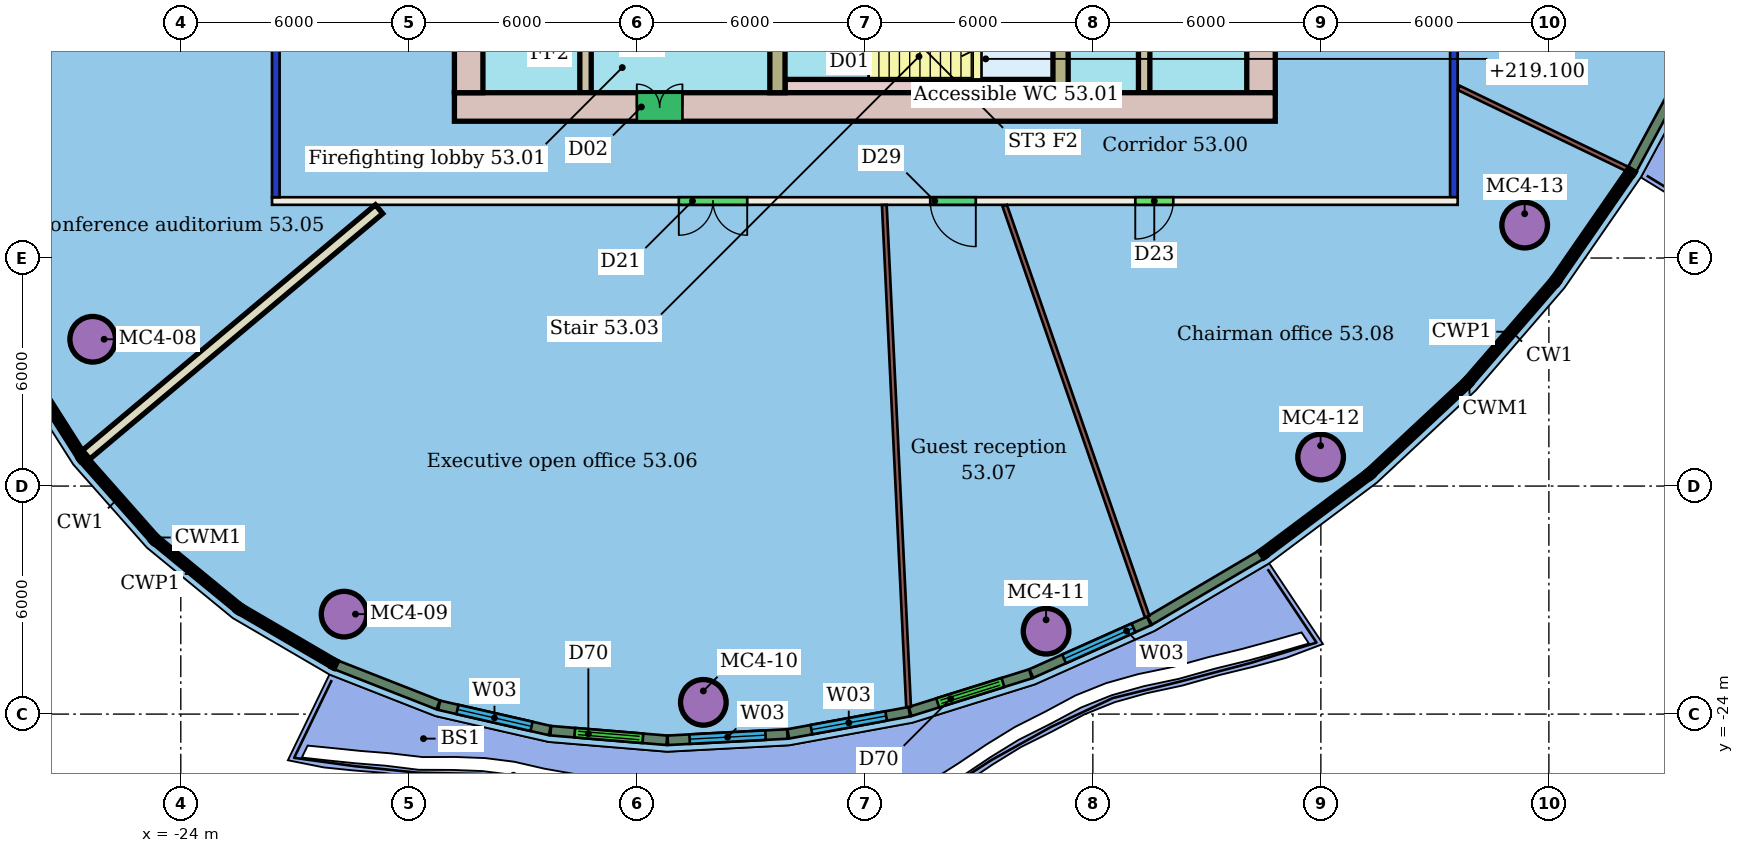
"""IFC4 building model, lengths in metres.
Left out: names, types, materials, properties, quantities, classifications, styles, units other than length and angle.
Written with IfcOpenShell. Run it as: python <this file> out.ifc"""

import sys

from ifc_helpers import new_model, si_unit, direction, frame, frame_2d, origin, origin_2d, place, context, subcontext, project, spatial, rectangle, hollow_circle, extrude, element, fill, save


model = new_model("IFC4")
c1 = context("Model", 3, precision=1e-05, world=origin(), true_north=direction((0.0, 1.0)))
c2 = subcontext(c1, "Body", "Model", "MODEL_VIEW")
j1 = project(units=[si_unit("LENGTHUNIT", "METRE"), si_unit("PLANEANGLEUNIT", "RADIAN")], contexts=[c1])
p1 = place(None, origin())
s1 = spatial("IfcSite", under=j1, at=p1, CompositionType="ELEMENT")
p2 = place(p1, origin())
s2 = spatial("IfcBuilding", under=s1, at=p2, CompositionType="ELEMENT")
p3 = place(p2, frame((0.0, 0.0, 217.3)))
s3 = spatial("IfcBuildingStorey", under=s2, at=p3, CompositionType="ELEMENT", Elevation=217.3)
for number, where, z_axis, x_axis in (
    (1, (-26.318, -14.137, 0.0), (0.0, 0.0, 1.0), (1.0, 0.0, 0.0)),
    (2, (-19.704, -21.37, 0.0), (0.0, 0.0, 1.0), (1.0, 0.0, 0.0)),
    (3, (-10.25, -23.691, 0.0), (0.0, 0.0, 1.0), (1.0, 0.0, 0.0)),
    (4, (-1.231, -21.819, 0.0), (0.0, 0.0, 1.0), (1.0, 0.0, 0.0)),
    (5, (5.993, -17.237, 0.0), (0.0, 0.0, 1.0), (1.0, 0.0, 0.0)),
    (6, (11.363, -11.134, 0.0), (0.0, 0.0, 1.0), (1.0, 0.0, 0.0)),
):
    element("IfcColumn", number, at=place(p3, frame(where, z_axis=z_axis, x_axis=x_axis)), inside=s3, PredefinedType="COLUMN", context=c2, shape_type="SweptSolid", body=[
        extrude(hollow_circle(Radius=0.6, WallThickness=0.045, at=origin_2d()), origin(), (0.0, 0.0, 1.0), 3.45),
    ])
p4 = place(p3, frame((9.6, -10.5, 0.0), z_axis=(0.0, 0.0, 1.0), x_axis=(-1.0, 0.0, 0.0)))
e7 = element("IfcWall", 7, at=p4, inside=s3, PredefinedType="PARTITIONING", context=c2, shape_type="SweptSolid", body=[
    extrude(rectangle(XDim=31.2, YDim=0.2, at=frame_2d((15.6, 0.0))), origin(), (0.0, 0.0, 1.0), 3.45),
])
p5 = place(p4, frame((18.695, 0.0, 0.0)))
e8 = element("IfcOpeningElement", 8, at=p5, cuts=e7, PredefinedType="OPENING", context=c2, shape_type="SweptSolid", body=[
    extrude(rectangle(XDim=1.8, YDim=2.1, at=frame_2d((0.9, 1.05))), frame((0.0, 0.11, 0.0), z_axis=(0.0, -1.0, 0.0), x_axis=(1.0, 0.0, 0.0)), (0.0, 0.0, 1.0), 0.22),
])
p6 = place(p4, frame((12.68, 0.0, 0.0)))
e9 = element("IfcOpeningElement", 9, at=p6, cuts=e7, PredefinedType="OPENING", context=c2, shape_type="SweptSolid", body=[
    extrude(rectangle(XDim=1.2, YDim=2.4, at=frame_2d((0.6, 1.2))), frame((0.0, 0.11, 0.0), z_axis=(0.0, -1.0, 0.0), x_axis=(1.0, 0.0, 0.0)), (0.0, 0.0, 1.0), 0.22),
])
p7 = place(p4, frame((7.484, 0.0, 0.0)))
e10 = element("IfcOpeningElement", 10, at=p7, cuts=e7, PredefinedType="OPENING", context=c2, shape_type="SweptSolid", body=[
    extrude(rectangle(XDim=1.0, YDim=2.4, at=frame_2d((0.5, 1.2))), frame((0.0, 0.11, 0.0), z_axis=(0.0, -1.0, 0.0), x_axis=(1.0, 0.0, 0.0)), (0.0, 0.0, 1.0), 0.22),
])
p8 = place(p3, frame((-21.5, -10.4, 0.0), z_axis=(0.0, 0.0, 1.0), x_axis=(0.0, 1.0, 0.0)))
e11 = element("IfcWall", 11, at=p8, inside=s3, PredefinedType="PARTITIONING", context=c2, shape_type="SweptSolid", body=[
    extrude(rectangle(XDim=20.8, YDim=0.2, at=frame_2d((10.4, 0.0))), origin(), (0.0, 0.0, 1.0), 3.05),
])
p9 = place(p8, frame((13.596, 0.0, 0.0)))
e12 = element("IfcOpeningElement", 12, at=p9, cuts=e11, PredefinedType="OPENING", context=c2, shape_type="SweptSolid", body=[
    extrude(rectangle(XDim=1.0, YDim=2.4, at=frame_2d((0.5, 1.2))), frame((0.0, 0.11, 0.0), z_axis=(0.0, -1.0, 0.0), x_axis=(1.0, 0.0, 0.0)), (0.0, 0.0, 1.0), 0.22),
])
p10 = place(p8, frame((5.876, 0.0, 0.0)))
e13 = element("IfcOpeningElement", 13, at=p10, cuts=e11, PredefinedType="OPENING", context=c2, shape_type="SweptSolid", body=[
    extrude(rectangle(XDim=1.8, YDim=2.4, at=frame_2d((0.9, 1.2))), frame((0.0, 0.11, 0.0), z_axis=(0.0, -1.0, 0.0), x_axis=(1.0, 0.0, 0.0)), (0.0, 0.0, 1.0), 0.22),
])
p11 = place(p3, frame((9.5, 10.4, 0.0), z_axis=(0.0, 0.0, 1.0), x_axis=(0.0, -1.0, 0.0)))
e14 = element("IfcWall", 14, at=p11, inside=s3, PredefinedType="PARTITIONING", context=c2, shape_type="SweptSolid", body=[
    extrude(rectangle(XDim=20.8, YDim=0.2, at=frame_2d((10.4, 0.0))), origin(), (0.0, 0.0, 1.0), 3.05),
])
p12 = place(p11, frame((14.911, 0.0, 0.0)))
e15 = element("IfcOpeningElement", 15, at=p12, cuts=e14, PredefinedType="OPENING", context=c2, shape_type="SweptSolid", body=[
    extrude(rectangle(XDim=0.9, YDim=2.1, at=frame_2d((0.45, 1.05))), frame((0.0, 0.11, 0.0), z_axis=(0.0, -1.0, 0.0), x_axis=(1.0, 0.0, 0.0)), (0.0, 0.0, 1.0), 0.22),
])
p13 = place(p11, frame((4.489, 0.0, 0.0)))
e16 = element("IfcOpeningElement", 16, at=p13, cuts=e14, PredefinedType="OPENING", context=c2, shape_type="SweptSolid", body=[
    extrude(rectangle(XDim=1.5, YDim=2.1, at=frame_2d((0.75, 1.05))), frame((0.0, 0.11, 0.0), z_axis=(0.0, -1.0, 0.0), x_axis=(1.0, 0.0, 0.0)), (0.0, 0.0, 1.0), 0.22),
])
p14 = place(p3, frame((-26.491, -17.175, 0.0), z_axis=(0.0, 0.0, 1.0), x_axis=(0.766383519692, 0.642383297374, 0.0)))
e17 = element("IfcWall", 17, at=p14, inside=s3, PredefinedType="PARTITIONING", context=c2, shape_type="SweptSolid", body=[
    extrude(rectangle(XDim=10.057, YDim=0.3, at=frame_2d((5.028, 0.0))), origin(), (0.0, 0.0, 1.0), 3.45),
])
p15 = place(p3, frame((-4.849, -23.814, 0.0), z_axis=(0.0, 0.0, 1.0), x_axis=(-0.048269364244, 0.998834354873, 0.0)))
e18 = element("IfcWall", 18, at=p15, inside=s3, PredefinedType="PARTITIONING", context=c2, shape_type="SweptSolid", body=[
    extrude(rectangle(XDim=13.226, YDim=0.125, at=frame_2d((6.613, 0.0))), origin(), (0.0, 0.0, 1.0), 3.45),
])
p16 = place(p3, frame((1.428, -21.434, 0.0), z_axis=(0.0, 0.0, 1.0), x_axis=(-0.327449773214, 0.944868586642, 0.0)))
e19 = element("IfcWall", 19, at=p16, inside=s3, PredefinedType="PARTITIONING", context=c2, shape_type="SweptSolid", body=[
    extrude(rectangle(XDim=11.445, YDim=0.125, at=frame_2d((5.722, 0.0))), origin(), (0.0, 0.0, 1.0), 3.45),
])
p17 = place(p3, frame((14.057, -9.655, 0.0), z_axis=(0.0, 0.0, 1.0), x_axis=(-0.901030422523, 0.433755896431, 0.0)))
e20 = element("IfcWall", 20, at=p17, inside=s3, PredefinedType="PARTITIONING", context=c2, shape_type="SweptSolid", body=[
    extrude(rectangle(XDim=4.917, YDim=0.125, at=frame_2d((2.458, 0.0))), origin(), (0.0, 0.0, 1.0), 3.45),
])
p18 = place(p3, frame((-19.907, -22.708, 0.0), z_axis=(0.0, 0.0, 1.0), x_axis=(0.930924579426, -0.365211483146, 0.0)))
e21 = element("IfcWall", 21, at=p18, inside=s3, PredefinedType="SOLIDWALL", context=c2, shape_type="SweptSolid", body=[
    extrude(rectangle(XDim=2.878, YDim=0.25, at=frame_2d((1.439, 0.0))), origin(), (0.0, 0.0, 1.0), 3.1),
])
p19 = place(p3, frame((-17.202, -23.767, 0.0), z_axis=(0.0, 0.0, 1.0), x_axis=(0.974849372508, -0.222864759263, 0.0)))
e22 = element("IfcWall", 22, at=p19, inside=s3, PredefinedType="SOLIDWALL", context=c2, shape_type="SweptSolid", body=[
    extrude(rectangle(XDim=2.986, YDim=0.25, at=frame_2d((1.493, 0.0))), origin(), (0.0, 0.0, 1.0), 3.1),
])
p20 = place(p19, frame((0.493, 0.0, 0.9)))
e23 = element("IfcOpeningElement", 23, at=p20, cuts=e22, PredefinedType="OPENING", context=c2, shape_type="SweptSolid", body=[
    extrude(rectangle(XDim=2.0, YDim=2.1, at=frame_2d((1.0, 1.05))), frame((0.0, 0.135, 0.0), z_axis=(0.0, -1.0, 0.0), x_axis=(1.0, 0.0, 0.0)), (0.0, 0.0, 1.0), 0.27),
])
p21 = place(p3, frame((-14.265, -24.437, 0.0), z_axis=(0.0, 0.0, 1.0), x_axis=(0.996603192192, -0.082353368555, 0.0)))
e24 = element("IfcWall", 24, at=p21, inside=s3, PredefinedType="SOLIDWALL", context=c2, shape_type="SweptSolid", body=[
    extrude(rectangle(XDim=3.065, YDim=0.25, at=frame_2d((1.533, 0.0))), origin(), (0.0, 0.0, 1.0), 3.1),
])
p22 = place(p21, frame((0.633, 0.0, 0.0)))
e25 = element("IfcOpeningElement", 25, at=p22, cuts=e24, PredefinedType="OPENING", context=c2, shape_type="SweptSolid", body=[
    extrude(rectangle(XDim=1.8, YDim=2.4, at=frame_2d((0.9, 1.2))), frame((0.0, 0.135, 0.0), z_axis=(0.0, -1.0, 0.0), x_axis=(1.0, 0.0, 0.0)), (0.0, 0.0, 1.0), 0.27),
])
p23 = place(p3, frame((-11.186, -24.689, 0.0), z_axis=(0.0, 0.0, 1.0), x_axis=(0.998611186538, 0.052684894627, 0.0)))
e26 = element("IfcWall", 26, at=p23, inside=s3, PredefinedType="SOLIDWALL", context=c2, shape_type="SweptSolid", body=[
    extrude(rectangle(XDim=3.151, YDim=0.25, at=frame_2d((1.576, 0.0))), origin(), (0.0, 0.0, 1.0), 3.1),
])
p24 = place(p23, frame((0.575, 0.0, 0.9)))
e27 = element("IfcOpeningElement", 27, at=p24, cuts=e26, PredefinedType="OPENING", context=c2, shape_type="SweptSolid", body=[
    extrude(rectangle(XDim=2.0, YDim=2.1, at=frame_2d((1.0, 1.05))), frame((0.0, 0.135, 0.0), z_axis=(0.0, -1.0, 0.0), x_axis=(1.0, 0.0, 0.0)), (0.0, 0.0, 1.0), 0.27),
])
p25 = place(p3, frame((-8.015, -24.521, 0.0), z_axis=(0.0, 0.0, 1.0), x_axis=(0.98363864292, 0.180152768931, 0.0)))
e28 = element("IfcWall", 28, at=p25, inside=s3, PredefinedType="SOLIDWALL", context=c2, shape_type="SweptSolid", body=[
    extrude(rectangle(XDim=3.238, YDim=0.25, at=frame_2d((1.619, 0.0))), origin(), (0.0, 0.0, 1.0), 3.1),
])
p26 = place(p25, frame((0.619, 0.0, 0.9)))
e29 = element("IfcOpeningElement", 29, at=p26, cuts=e28, PredefinedType="OPENING", context=c2, shape_type="SweptSolid", body=[
    extrude(rectangle(XDim=2.0, YDim=2.1, at=frame_2d((1.0, 1.05))), frame((0.0, 0.135, 0.0), z_axis=(0.0, -1.0, 0.0), x_axis=(1.0, 0.0, 0.0)), (0.0, 0.0, 1.0), 0.27),
])
p27 = place(p3, frame((-4.808, -23.932, 0.0), z_axis=(0.0, 0.0, 1.0), x_axis=(0.954355541855, 0.298672897551, 0.0)))
e30 = element("IfcWall", 30, at=p27, inside=s3, PredefinedType="SOLIDWALL", context=c2, shape_type="SweptSolid", body=[
    extrude(rectangle(XDim=3.319, YDim=0.25, at=frame_2d((1.659, 0.0))), origin(), (0.0, 0.0, 1.0), 3.1),
])
p28 = place(p27, frame((0.759, 0.0, 0.0)))
e31 = element("IfcOpeningElement", 31, at=p28, cuts=e30, PredefinedType="OPENING", context=c2, shape_type="SweptSolid", body=[
    extrude(rectangle(XDim=1.8, YDim=2.4, at=frame_2d((0.9, 1.2))), frame((0.0, 0.135, 0.0), z_axis=(0.0, -1.0, 0.0), x_axis=(1.0, 0.0, 0.0)), (0.0, 0.0, 1.0), 0.27),
])
p29 = place(p3, frame((-1.62, -22.933, 0.0), z_axis=(0.0, 0.0, 1.0), x_axis=(0.913013847156, 0.40792856593, 0.0)))
e32 = element("IfcWall", 32, at=p29, inside=s3, PredefinedType="SOLIDWALL", context=c2, shape_type="SweptSolid", body=[
    extrude(rectangle(XDim=3.39, YDim=0.25, at=frame_2d((1.695, 0.0))), origin(), (0.0, 0.0, 1.0), 3.1),
])
p30 = place(p29, frame((0.945, 0.0, 0.9)))
e33 = element("IfcOpeningElement", 33, at=p30, cuts=e32, PredefinedType="OPENING", context=c2, shape_type="SweptSolid", body=[
    extrude(rectangle(XDim=2.0, YDim=2.1, at=frame_2d((1.0, 1.05))), frame((0.0, 0.135, 0.0), z_axis=(0.0, -1.0, 0.0), x_axis=(1.0, 0.0, 0.0)), (0.0, 0.0, 1.0), 0.27),
])
for number, where, z_axis, x_axis in (
    (34, (1.495, -21.54, 0.0), (0.0, 0.0, 1.0), (0.861, 0.508, 0.0)),
    (35, (14.19, -9.671, 0.0), (0.0, 0.0, 1.0), (0.475, 0.88, 0.0)),
):
    element("IfcWall", number, at=place(p3, frame(where, z_axis=z_axis, x_axis=x_axis)), inside=s3, PredefinedType="SOLIDWALL", context=c2, shape_type="SweptSolid", body=[
        extrude(rectangle(XDim=3.403, YDim=0.25, at=frame_2d((1.701, 0.0))), origin(), (0.0, 0.0, 1.0), 3.1),
    ])
p31 = place(p3, frame((-16.8, -8.025, 0.0), z_axis=(0.0, 0.0, 1.0), x_axis=(1.0, 0.0, 0.0)))
e36 = element("IfcWall", 36, at=p31, inside=s3, PredefinedType="SHEAR", context=c2, shape_type="SweptSolid", body=[
    extrude(rectangle(XDim=21.6, YDim=0.75, at=frame_2d((10.8, 0.0))), origin(), (0.0, 0.0, 1.0), 3.3),
])
p32 = place(p31, frame((4.8, 0.0, 0.0)))
e37 = element("IfcOpeningElement", 37, at=p32, cuts=e36, PredefinedType="OPENING", context=c2, shape_type="SweptSolid", body=[
    extrude(rectangle(XDim=1.2, YDim=2.1, at=frame_2d((0.6, 1.05))), frame((0.0, 0.385, 0.0), z_axis=(0.0, -1.0, 0.0), x_axis=(1.0, 0.0, 0.0)), (0.0, 0.0, 1.0), 0.77),
])
p33 = place(p3, frame((-16.425, 7.65, 0.0), z_axis=(0.0, 0.0, 1.0), x_axis=(0.0, -1.0, 0.0)))
e38 = element("IfcWall", 38, at=p33, inside=s3, PredefinedType="SHEAR", context=c2, shape_type="SweptSolid", body=[
    extrude(rectangle(XDim=15.3, YDim=0.75, at=frame_2d((7.65, 0.0))), origin(), (0.0, 0.0, 1.0), 3.3),
])
p34 = place(p33, frame((11.25, 0.0, 0.0)))
e39 = element("IfcOpeningElement", 39, at=p34, cuts=e38, PredefinedType="OPENING", context=c2, shape_type="SweptSolid", body=[
    extrude(rectangle(XDim=1.2, YDim=2.1, at=frame_2d((0.6, 1.05))), frame((0.0, 0.385, 0.0), z_axis=(0.0, -1.0, 0.0), x_axis=(1.0, 0.0, 0.0)), (0.0, 0.0, 1.0), 0.77),
])
p35 = place(p33, frame((2.85, 0.0, 0.0)))
e40 = element("IfcOpeningElement", 40, at=p35, cuts=e38, PredefinedType="OPENING", context=c2, shape_type="SweptSolid", body=[
    extrude(rectangle(XDim=1.2, YDim=2.1, at=frame_2d((0.6, 1.05))), frame((0.0, 0.385, 0.0), z_axis=(0.0, -1.0, 0.0), x_axis=(1.0, 0.0, 0.0)), (0.0, 0.0, 1.0), 0.77),
])
p36 = place(p3, frame((4.425, -7.65, 0.0), z_axis=(0.0, 0.0, 1.0), x_axis=(0.0, 1.0, 0.0)))
e41 = element("IfcWall", 41, at=p36, inside=s3, PredefinedType="SHEAR", context=c2, shape_type="SweptSolid", body=[
    extrude(rectangle(XDim=15.3, YDim=0.75, at=frame_2d((7.65, 0.0))), origin(), (0.0, 0.0, 1.0), 3.3),
])
p37 = place(p36, frame((2.85, 0.0, 0.0)))
e42 = element("IfcOpeningElement", 42, at=p37, cuts=e41, PredefinedType="OPENING", context=c2, shape_type="SweptSolid", body=[
    extrude(rectangle(XDim=1.2, YDim=2.1, at=frame_2d((0.6, 1.05))), frame((0.0, 0.385, 0.0), z_axis=(0.0, -1.0, 0.0), x_axis=(1.0, 0.0, 0.0)), (0.0, 0.0, 1.0), 0.77),
])
p38 = place(p36, frame((11.25, 0.0, 0.0)))
e43 = element("IfcOpeningElement", 43, at=p38, cuts=e41, PredefinedType="OPENING", context=c2, shape_type="SweptSolid", body=[
    extrude(rectangle(XDim=1.2, YDim=2.1, at=frame_2d((0.6, 1.05))), frame((0.0, 0.385, 0.0), z_axis=(0.0, -1.0, 0.0), x_axis=(1.0, 0.0, 0.0)), (0.0, 0.0, 1.0), 0.77),
])
p39 = place(p3, frame((-13.35, 7.65, 0.0), z_axis=(0.0, 0.0, 1.0), x_axis=(0.0, -1.0, 0.0)))
e44 = element("IfcWall", 44, at=p39, inside=s3, PredefinedType="SHEAR", context=c2, shape_type="SweptSolid", body=[
    extrude(rectangle(XDim=15.3, YDim=0.3, at=frame_2d((7.65, 0.0))), origin(), (0.0, 0.0, 1.0), 3.3),
])
p40 = place(p39, frame((6.9, 0.0, 0.0)))
e45 = element("IfcOpeningElement", 45, at=p40, cuts=e44, PredefinedType="OPENING", context=c2, shape_type="SweptSolid", body=[
    extrude(rectangle(XDim=1.5, YDim=2.1, at=frame_2d((0.75, 1.05))), frame((0.0, 0.16, 0.0), z_axis=(0.0, -1.0, 0.0), x_axis=(1.0, 0.0, 0.0)), (0.0, 0.0, 1.0), 0.32),
])
p41 = place(p3, frame((1.35, -7.65, 0.0), z_axis=(0.0, 0.0, 1.0), x_axis=(0.0, 1.0, 0.0)))
e46 = element("IfcWall", 46, at=p41, inside=s3, PredefinedType="SHEAR", context=c2, shape_type="SweptSolid", body=[
    extrude(rectangle(XDim=15.3, YDim=0.3, at=frame_2d((7.65, 0.0))), origin(), (0.0, 0.0, 1.0), 3.3),
])
p42 = place(p41, frame((1.56, 0.0, 0.0)))
e47 = element("IfcOpeningElement", 47, at=p42, cuts=e46, PredefinedType="OPENING", context=c2, shape_type="SweptSolid", body=[
    extrude(rectangle(XDim=1.0, YDim=2.1, at=frame_2d((0.5, 1.05))), frame((0.0, 0.16, 0.0), z_axis=(0.0, -1.0, 0.0), x_axis=(1.0, 0.0, 0.0)), (0.0, 0.0, 1.0), 0.32),
])
p43 = place(p41, frame((6.9, 0.0, 0.0)))
e48 = element("IfcOpeningElement", 48, at=p43, cuts=e46, PredefinedType="OPENING", context=c2, shape_type="SweptSolid", body=[
    extrude(rectangle(XDim=1.5, YDim=2.1, at=frame_2d((0.75, 1.05))), frame((0.0, 0.16, 0.0), z_axis=(0.0, -1.0, 0.0), x_axis=(1.0, 0.0, 0.0)), (0.0, 0.0, 1.0), 0.32),
])
p44 = place(p3, frame((-8.3, -3.88, 0.0), z_axis=(0.0, 0.0, 1.0), x_axis=(0.0, -1.0, 0.0)))
e49 = element("IfcWall", 49, at=p44, inside=s3, PredefinedType="SHEAR", context=c2, shape_type="SweptSolid", body=[
    extrude(rectangle(XDim=3.77, YDim=0.4, at=frame_2d((1.885, 0.0))), origin(), (0.0, 0.0, 1.0), 3.3),
])
p45 = place(p44, frame((1.11, 0.0, 0.0)))
e50 = element("IfcOpeningElement", 50, at=p45, cuts=e49, PredefinedType="OPENING", context=c2, shape_type="SweptSolid", body=[
    extrude(rectangle(XDim=1.2, YDim=2.1, at=frame_2d((0.6, 1.05))), frame((0.0, 0.21, 0.0), z_axis=(0.0, -1.0, 0.0), x_axis=(1.0, 0.0, 0.0)), (0.0, 0.0, 1.0), 0.42),
])
p46 = place(p3, frame((-0.85, -3.88, 0.0), z_axis=(0.0, 0.0, 1.0), x_axis=(0.0, -1.0, 0.0)))
e51 = element("IfcWall", 51, at=p46, inside=s3, PredefinedType="SHEAR", context=c2, shape_type="SweptSolid", body=[
    extrude(rectangle(XDim=3.77, YDim=0.4, at=frame_2d((1.885, 0.0))), origin(), (0.0, 0.0, 1.0), 3.3),
])
p47 = place(p3, frame((-8.1, -7.475, 0.0), z_axis=(0.0, 0.0, 1.0), x_axis=(1.0, 0.0, 0.0)))
e52 = element("IfcWall", 52, at=p47, inside=s3, PredefinedType="SHEAR", context=c2, shape_type="SweptSolid", body=[
    extrude(rectangle(XDim=7.05, YDim=0.35, at=frame_2d((3.525, 0.0))), origin(), (0.0, 0.0, 1.0), 3.3),
])
p48 = place(p5, origin())
e53 = element("IfcDoor", 53, at=p48, inside=s3, OperationType="DOUBLE_DOOR_SINGLE_SWING", PredefinedType="DOOR", context=c2, shape_type="SweptSolid", body=[
    extrude(rectangle(XDim=1.8, YDim=2.1, at=frame_2d((0.9, 1.05))), frame((0.0, 0.025, 0.0), z_axis=(0.0, -1.0, 0.0), x_axis=(1.0, 0.0, 0.0)), (0.0, 0.0, 1.0), 0.05),
])
fill(e8, e53)
p49 = place(p6, origin())
e54 = element("IfcDoor", 54, at=p49, inside=s3, OperationType="SINGLE_SWING_LEFT", PredefinedType="DOOR", context=c2, shape_type="SweptSolid", body=[
    extrude(rectangle(XDim=1.2, YDim=2.4, at=frame_2d((0.6, 1.2))), frame((0.0, 0.025, 0.0), z_axis=(0.0, -1.0, 0.0), x_axis=(1.0, 0.0, 0.0)), (0.0, 0.0, 1.0), 0.05),
])
fill(e9, e54)
p50 = place(p7, origin())
e55 = element("IfcDoor", 55, at=p50, inside=s3, OperationType="SINGLE_SWING_RIGHT", PredefinedType="DOOR", context=c2, shape_type="SweptSolid", body=[
    extrude(rectangle(XDim=1.0, YDim=2.4, at=frame_2d((0.5, 1.2))), frame((0.0, 0.025, 0.0), z_axis=(0.0, -1.0, 0.0), x_axis=(1.0, 0.0, 0.0)), (0.0, 0.0, 1.0), 0.05),
])
fill(e10, e55)
p51 = place(p20, origin())
e56 = element("IfcWindow", 56, at=p51, inside=s3, PartitioningType="SINGLE_PANEL", PredefinedType="WINDOW", context=c2, shape_type="SweptSolid", body=[
    extrude(rectangle(XDim=2.0, YDim=2.1, at=frame_2d((1.0, 1.05))), frame((0.0, 0.03, 0.0), z_axis=(0.0, -1.0, 0.0), x_axis=(1.0, 0.0, 0.0)), (0.0, 0.0, 1.0), 0.06),
])
fill(e23, e56)
p52 = place(p22, origin())
e57 = element("IfcDoor", 57, at=p52, inside=s3, OperationType="DOUBLE_DOOR_SLIDING", PredefinedType="DOOR", context=c2, shape_type="SweptSolid", body=[
    extrude(rectangle(XDim=1.8, YDim=2.4, at=frame_2d((0.9, 1.2))), frame((0.0, 0.025, 0.0), z_axis=(0.0, -1.0, 0.0), x_axis=(1.0, 0.0, 0.0)), (0.0, 0.0, 1.0), 0.05),
])
fill(e25, e57)
p53 = place(p24, origin())
e58 = element("IfcWindow", 58, at=p53, inside=s3, PartitioningType="SINGLE_PANEL", PredefinedType="WINDOW", context=c2, shape_type="SweptSolid", body=[
    extrude(rectangle(XDim=2.0, YDim=2.1, at=frame_2d((1.0, 1.05))), frame((0.0, 0.03, 0.0), z_axis=(0.0, -1.0, 0.0), x_axis=(1.0, 0.0, 0.0)), (0.0, 0.0, 1.0), 0.06),
])
fill(e27, e58)
p54 = place(p26, origin())
e59 = element("IfcWindow", 59, at=p54, inside=s3, PartitioningType="SINGLE_PANEL", PredefinedType="WINDOW", context=c2, shape_type="SweptSolid", body=[
    extrude(rectangle(XDim=2.0, YDim=2.1, at=frame_2d((1.0, 1.05))), frame((0.0, 0.03, 0.0), z_axis=(0.0, -1.0, 0.0), x_axis=(1.0, 0.0, 0.0)), (0.0, 0.0, 1.0), 0.06),
])
fill(e29, e59)
p55 = place(p28, origin())
e60 = element("IfcDoor", 60, at=p55, inside=s3, OperationType="DOUBLE_DOOR_SLIDING", PredefinedType="DOOR", context=c2, shape_type="SweptSolid", body=[
    extrude(rectangle(XDim=1.8, YDim=2.4, at=frame_2d((0.9, 1.2))), frame((0.0, 0.025, 0.0), z_axis=(0.0, -1.0, 0.0), x_axis=(1.0, 0.0, 0.0)), (0.0, 0.0, 1.0), 0.05),
])
fill(e31, e60)
p56 = place(p30, origin())
e61 = element("IfcWindow", 61, at=p56, inside=s3, PartitioningType="SINGLE_PANEL", PredefinedType="WINDOW", context=c2, shape_type="SweptSolid", body=[
    extrude(rectangle(XDim=2.0, YDim=2.1, at=frame_2d((1.0, 1.05))), frame((0.0, 0.03, 0.0), z_axis=(0.0, -1.0, 0.0), x_axis=(1.0, 0.0, 0.0)), (0.0, 0.0, 1.0), 0.06),
])
fill(e33, e61)
p57 = place(p32, origin())
e62 = element("IfcDoor", 62, at=p57, inside=s3, OperationType="DOUBLE_DOOR_SINGLE_SWING", PredefinedType="NOTDEFINED", context=c2, shape_type="SweptSolid", body=[
    extrude(rectangle(XDim=1.2, YDim=2.1, at=frame_2d((0.6, 1.05))), frame((0.0, 0.025, 0.0), z_axis=(0.0, -1.0, 0.0), x_axis=(1.0, 0.0, 0.0)), (0.0, 0.0, 1.0), 0.05),
])
fill(e37, e62)
save(model, sys.argv[1])
